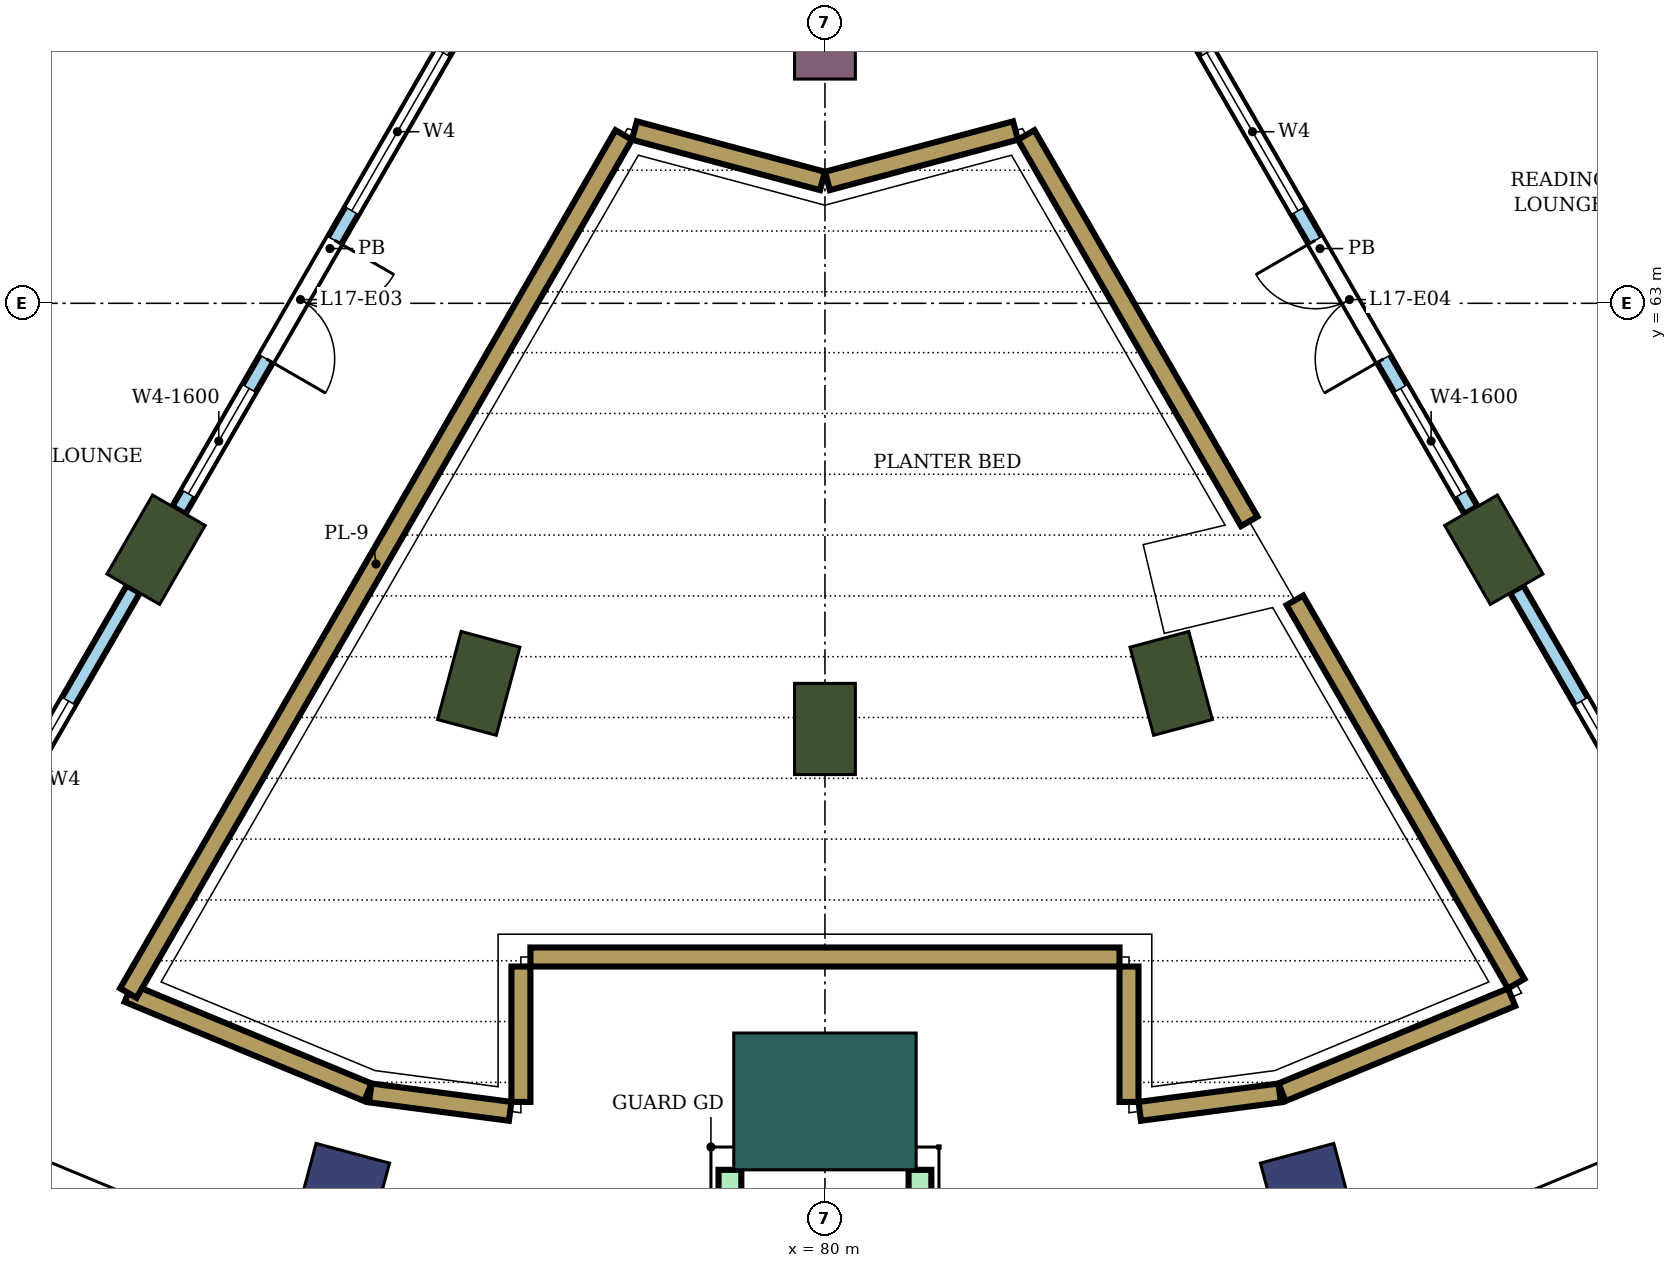
"""IFC4 building model, lengths in metres.
Left out: names, types, materials, properties, quantities, classifications, styles, units other than length and angle.
Written with IfcOpenShell. Run it as: python <this file> out.ifc"""

import sys

from ifc_helpers import new_model, si_unit, direction, frame, frame_2d, origin, origin_2d, place, context, subcontext, project, spatial, rectangle, extrude, element, fill, save


model = new_model("IFC4")
c1 = context("Model", 3, precision=1e-05, world=origin(), true_north=direction((0.0, 1.0)))
c2 = subcontext(c1, "Body", "Model", "MODEL_VIEW")
j1 = project(units=[si_unit("LENGTHUNIT", "METRE"), si_unit("PLANEANGLEUNIT", "RADIAN")], contexts=[c1])
p1 = place(None, origin())
s1 = spatial("IfcSite", under=j1, at=p1, CompositionType="ELEMENT")
p2 = place(p1, origin())
s2 = spatial("IfcBuilding", under=s1, at=p2, CompositionType="ELEMENT")
p3 = place(p2, frame((0.0, 0.0, 74.4)))
s3 = spatial("IfcBuildingStorey", under=s2, at=p3, CompositionType="ELEMENT", Elevation=74.4)
for number, where, z_axis, x_axis in (
    (1, (73.633, 51.238, 0.0), (0.0, 0.0, 1.0), (-0.259, -0.966, 0.0)),
    (2, (86.367, 51.238, 0.0), (0.0, 0.0, 1.0), (0.259, -0.966, 0.0)),
):
    element("IfcColumn", number, at=place(p3, frame(where, z_axis=z_axis, x_axis=x_axis)), inside=s3, PredefinedType="COLUMN", context=c2, shape_type="SweptSolid", body=[
        extrude(rectangle(XDim=1.2, YDim=1.0, at=origin_2d()), origin(), (0.0, 0.0, 1.0), 8.0),
    ])
for number, where, z_axis, x_axis in (
    (3, (71.2, 59.758, 0.0), (0.0, 0.0, 1.0), (-0.5, -0.866, 0.0)),
    (4, (75.445, 58.0, 0.0), (0.0, 0.0, 1.0), (-0.259, -0.966, 0.0)),
    (5, (80.0, 57.4, 0.0), (0.0, 0.0, 1.0), (0.0, -1.0, 0.0)),
    (6, (84.555, 58.0, 0.0), (0.0, 0.0, 1.0), (0.259, -0.966, 0.0)),
    (7, (88.8, 59.758, 0.0), (0.0, 0.0, 1.0), (0.5, -0.866, 0.0)),
):
    element("IfcColumn", number, at=place(p3, frame(where, z_axis=z_axis, x_axis=x_axis)), inside=s3, PredefinedType="COLUMN", context=c2, shape_type="SweptSolid", body=[
        extrude(rectangle(XDim=1.2, YDim=0.8, at=origin_2d()), origin(), (0.0, 0.0, 1.0), 8.0),
    ])
p4 = place(p3, frame((80.0, 66.4, 0.0), z_axis=(0.0, 0.0, 1.0), x_axis=(0.0, -1.0, 0.0)))
e8 = element("IfcColumn", 8, at=p4, inside=s3, PredefinedType="COLUMN", context=c2, shape_type="SweptSolid", body=[
    extrude(rectangle(XDim=0.9, YDim=0.8, at=origin_2d()), origin(), (0.0, 0.0, 1.0), 8.0),
])
p5 = place(p3, frame((80.0, 52.5, 0.0), z_axis=(0.0, 0.0, 1.0), x_axis=(0.0, -1.0, 0.0)))
e9 = element("IfcColumn", 9, at=p5, inside=s3, PredefinedType="COLUMN", context=c2, shape_type="SweptSolid", body=[
    extrude(rectangle(XDim=1.8, YDim=2.4, at=origin_2d()), origin(), (0.0, 0.0, 1.0), 8.0),
])
for number, where, z_axis, x_axis in (
    (10, (78.75, 51.6, 0.0), (0.0, 0.0, 1.0), (0.0, -1.0, 0.0)),
    (11, (81.25, 51.6, 0.0), (0.0, 0.0, 1.0), (0.0, -1.0, 0.0)),
):
    element("IfcWall", number, at=place(p3, frame(where, z_axis=z_axis, x_axis=x_axis)), inside=s3, PredefinedType="NOTDEFINED", context=c2, shape_type="SweptSolid", body=[
        extrude(rectangle(XDim=2.416, YDim=0.3, at=frame_2d((1.208, 0.0))), origin(), (0.0, 0.0, 1.0), 8.0),
    ])
p6 = place(p3, frame((70.835, 53.926, 0.0), z_axis=(0.0, 0.0, 1.0), x_axis=(0.923871147788, -0.38270367425, 0.0)))
e12 = element("IfcWall", 12, at=p6, inside=s3, PredefinedType="USERDEFINED", context=c2, shape_type="SweptSolid", body=[
    extrude(rectangle(XDim=3.411, YDim=0.25, at=frame_2d((1.706, 0.0))), origin(), (0.0, 0.0, 1.0), 0.6),
])
p7 = place(p3, frame((74.018, 52.612, 0.0), z_axis=(0.0, 0.0, 1.0), x_axis=(0.991436829887, -0.130587182926, 0.0)))
e13 = element("IfcWall", 13, at=p7, inside=s3, PredefinedType="USERDEFINED", context=c2, shape_type="SweptSolid", body=[
    extrude(rectangle(XDim=1.856, YDim=0.25, at=frame_2d((0.928, 0.0))), origin(), (0.0, 0.0, 1.0), 0.6),
])
p8 = place(p3, frame((76.0, 52.493, 0.0), z_axis=(0.0, 0.0, 1.0), x_axis=(0.0, 1.0, 0.0)))
e14 = element("IfcWall", 14, at=p8, inside=s3, PredefinedType="USERDEFINED", context=c2, shape_type="SweptSolid", body=[
    extrude(rectangle(XDim=1.781, YDim=0.25, at=frame_2d((0.891, 0.0))), origin(), (0.0, 0.0, 1.0), 0.6),
])
p9 = place(p3, frame((76.125, 54.4, 0.0), z_axis=(0.0, 0.0, 1.0), x_axis=(1.0, 0.0, 0.0)))
e15 = element("IfcWall", 15, at=p9, inside=s3, PredefinedType="USERDEFINED", context=c2, shape_type="SweptSolid", body=[
    extrude(rectangle(XDim=7.75, YDim=0.25, at=frame_2d((3.875, 0.0))), origin(), (0.0, 0.0, 1.0), 0.6),
])
p10 = place(p3, frame((84.0, 54.275, 0.0), z_axis=(0.0, 0.0, 1.0), x_axis=(0.0, -1.0, 0.0)))
e16 = element("IfcWall", 16, at=p10, inside=s3, PredefinedType="USERDEFINED", context=c2, shape_type="SweptSolid", body=[
    extrude(rectangle(XDim=1.781, YDim=0.25, at=frame_2d((0.891, 0.0))), origin(), (0.0, 0.0, 1.0), 0.6),
])
p11 = place(p3, frame((84.141, 52.369, 0.0), z_axis=(0.0, 0.0, 1.0), x_axis=(0.991436829887, 0.130587182926, 0.0)))
e17 = element("IfcWall", 17, at=p11, inside=s3, PredefinedType="USERDEFINED", context=c2, shape_type="SweptSolid", body=[
    extrude(rectangle(XDim=1.856, YDim=0.25, at=frame_2d((0.928, 0.0))), origin(), (0.0, 0.0, 1.0), 0.6),
])
p12 = place(p3, frame((86.014, 52.62, 0.0), z_axis=(0.0, 0.0, 1.0), x_axis=(0.923863886655, 0.382721202621, 0.0)))
e18 = element("IfcWall", 18, at=p12, inside=s3, PredefinedType="USERDEFINED", context=c2, shape_type="SweptSolid", body=[
    extrude(rectangle(XDim=3.269, YDim=0.25, at=frame_2d((1.634, 0.0))), origin(), (0.0, 0.0, 1.0), 0.6),
])
p13 = place(p3, frame((89.094, 54.049, 0.0), z_axis=(0.0, 0.0, 1.0), x_axis=(-0.50000795037, 0.866020813587, 0.0)))
e19 = element("IfcWall", 19, at=p13, inside=s3, PredefinedType="USERDEFINED", context=c2, shape_type="SweptSolid", body=[
    extrude(rectangle(XDim=5.823, YDim=0.25, at=frame_2d((2.912, 0.0))), origin(), (0.0, 0.0, 1.0), 0.6),
])
p14 = place(p3, frame((85.582, 60.131, 0.0), z_axis=(0.0, 0.0, 1.0), x_axis=(-0.499999689456, 0.866025583077, 0.0)))
e20 = element("IfcWall", 20, at=p14, inside=s3, PredefinedType="USERDEFINED", context=c2, shape_type="SweptSolid", body=[
    extrude(rectangle(XDim=5.87, YDim=0.25, at=frame_2d((2.935, 0.0))), origin(), (0.0, 0.0, 1.0), 0.6),
])
for number, where, z_axis, x_axis in (
    (21, (82.507, 65.273, 0.0), (0.0, 0.0, 1.0), (-0.966, -0.259, 0.0)),
    (22, (79.968, 64.61, 0.0), (0.0, 0.0, 1.0), (-0.966, 0.259, 0.0)),
):
    element("IfcWall", number, at=place(p3, frame(where, z_axis=z_axis, x_axis=x_axis)), inside=s3, PredefinedType="USERDEFINED", context=c2, shape_type="SweptSolid", body=[
        extrude(rectangle(XDim=2.562, YDim=0.25, at=frame_2d((1.281, 0.0))), origin(), (0.0, 0.0, 1.0), 0.6),
    ])
p15 = place(p3, frame((77.353, 65.215, 0.0), z_axis=(0.0, 0.0, 1.0), x_axis=(-0.499990498062, -0.866030889661, 0.0)))
e23 = element("IfcWall", 23, at=p15, inside=s3, PredefinedType="USERDEFINED", context=c2, shape_type="SweptSolid", body=[
    extrude(rectangle(XDim=13.035, YDim=0.25, at=frame_2d((6.518, 0.0))), origin(), (0.0, 0.0, 1.0), 0.6),
])
p16 = place(p3, frame((75.475, 67.162, 0.0), z_axis=(0.0, 0.0, 1.0), x_axis=(-0.50001663867, -0.86601579723, 0.0)))
e24 = element("IfcWall", 24, at=p16, inside=s3, PredefinedType="NOTDEFINED", context=c2, shape_type="SweptSolid", body=[
    extrude(rectangle(XDim=7.95, YDim=0.2, at=frame_2d((3.975, 0.0))), origin(), (0.0, 0.0, 1.0), 8.0),
])
p17 = place(p16, frame((1.0, 0.0, 0.3)))
e25 = element("IfcOpeningElement", 25, at=p17, cuts=e24, PredefinedType="OPENING", context=c2, shape_type="SweptSolid", body=[
    extrude(rectangle(XDim=2.4, YDim=3.6, at=frame_2d((1.2, 1.8))), frame((0.0, 0.11, 0.0), z_axis=(0.0, -1.0, 0.0), x_axis=(1.0, 0.0, 0.0)), (0.0, 0.0, 1.0), 0.22),
])
p18 = place(p16, frame((3.85, 0.0, 0.0)))
e26 = element("IfcOpeningElement", 26, at=p18, cuts=e24, PredefinedType="OPENING", context=c2, shape_type="SweptSolid", body=[
    extrude(rectangle(XDim=1.8, YDim=2.4, at=frame_2d((0.9, 1.2))), frame((0.0, 0.11, 0.0), z_axis=(0.0, -1.0, 0.0), x_axis=(1.0, 0.0, 0.0)), (0.0, 0.0, 1.0), 0.22),
])
p19 = place(p16, frame((6.1, 0.0, 0.3)))
e27 = element("IfcOpeningElement", 27, at=p19, cuts=e24, PredefinedType="OPENING", context=c2, shape_type="SweptSolid", body=[
    extrude(rectangle(XDim=1.6, YDim=3.6, at=frame_2d((0.8, 1.8))), frame((0.0, 0.11, 0.0), z_axis=(0.0, -1.0, 0.0), x_axis=(1.0, 0.0, 0.0)), (0.0, 0.0, 1.0), 0.22),
])
p20 = place(p3, frame((70.9, 59.238, 0.0), z_axis=(0.0, 0.0, 1.0), x_axis=(-0.499987231761, -0.866032775405, 0.0)))
e28 = element("IfcWall", 28, at=p20, inside=s3, PredefinedType="NOTDEFINED", context=c2, shape_type="SweptSolid", body=[
    extrude(rectangle(XDim=5.8, YDim=0.2, at=frame_2d((2.9, 0.0))), origin(), (0.0, 0.0, 1.0), 8.0),
])
p21 = place(p20, frame((1.7, 0.0, 0.3)))
e29 = element("IfcOpeningElement", 29, at=p21, cuts=e28, PredefinedType="OPENING", context=c2, shape_type="SweptSolid", body=[
    extrude(rectangle(XDim=2.4, YDim=3.6, at=frame_2d((1.2, 1.8))), frame((0.0, 0.11, 0.0), z_axis=(0.0, -1.0, 0.0), x_axis=(1.0, 0.0, 0.0)), (0.0, 0.0, 1.0), 0.22),
])
p22 = place(p3, frame((84.525, 67.162, 0.0), z_axis=(0.0, 0.0, 1.0), x_axis=(0.50001663867, -0.86601579723, 0.0)))
e30 = element("IfcWall", 30, at=p22, inside=s3, PredefinedType="NOTDEFINED", context=c2, shape_type="SweptSolid", body=[
    extrude(rectangle(XDim=7.95, YDim=0.2, at=frame_2d((3.975, 0.0))), origin(), (0.0, 0.0, 1.0), 8.0),
])
p23 = place(p22, frame((1.0, 0.0, 0.3)))
e31 = element("IfcOpeningElement", 31, at=p23, cuts=e30, PredefinedType="OPENING", context=c2, shape_type="SweptSolid", body=[
    extrude(rectangle(XDim=2.4, YDim=3.6, at=frame_2d((1.2, 1.8))), frame((0.0, 0.11, 0.0), z_axis=(0.0, -1.0, 0.0), x_axis=(1.0, 0.0, 0.0)), (0.0, 0.0, 1.0), 0.22),
])
p24 = place(p22, frame((3.85, 0.0, 0.0)))
e32 = element("IfcOpeningElement", 32, at=p24, cuts=e30, PredefinedType="OPENING", context=c2, shape_type="SweptSolid", body=[
    extrude(rectangle(XDim=1.8, YDim=2.4, at=frame_2d((0.9, 1.2))), frame((0.0, 0.11, 0.0), z_axis=(0.0, -1.0, 0.0), x_axis=(1.0, 0.0, 0.0)), (0.0, 0.0, 1.0), 0.22),
])
p25 = place(p22, frame((6.1, 0.0, 0.3)))
e33 = element("IfcOpeningElement", 33, at=p25, cuts=e30, PredefinedType="OPENING", context=c2, shape_type="SweptSolid", body=[
    extrude(rectangle(XDim=1.6, YDim=3.6, at=frame_2d((0.8, 1.8))), frame((0.0, 0.11, 0.0), z_axis=(0.0, -1.0, 0.0), x_axis=(1.0, 0.0, 0.0)), (0.0, 0.0, 1.0), 0.22),
])
p26 = place(p3, frame((89.1, 59.238, 0.0), z_axis=(0.0, 0.0, 1.0), x_axis=(0.499987231761, -0.866032775405, 0.0)))
e34 = element("IfcWall", 34, at=p26, inside=s3, PredefinedType="NOTDEFINED", context=c2, shape_type="SweptSolid", body=[
    extrude(rectangle(XDim=5.8, YDim=0.2, at=frame_2d((2.9, 0.0))), origin(), (0.0, 0.0, 1.0), 8.0),
])
p27 = place(p26, frame((1.7, 0.0, 0.3)))
e35 = element("IfcOpeningElement", 35, at=p27, cuts=e34, PredefinedType="OPENING", context=c2, shape_type="SweptSolid", body=[
    extrude(rectangle(XDim=2.4, YDim=3.6, at=frame_2d((1.2, 1.8))), frame((0.0, 0.11, 0.0), z_axis=(0.0, -1.0, 0.0), x_axis=(1.0, 0.0, 0.0)), (0.0, 0.0, 1.0), 0.22),
])
p28 = place(p17, origin())
e36 = element("IfcWindow", 36, at=p28, inside=s3, PartitioningType="SINGLE_PANEL", PredefinedType="WINDOW", context=c2, shape_type="SweptSolid", body=[
    extrude(rectangle(XDim=2.4, YDim=3.6, at=frame_2d((1.2, 1.8))), frame((0.0, 0.03, 0.0), z_axis=(0.0, -1.0, 0.0), x_axis=(1.0, 0.0, 0.0)), (0.0, 0.0, 1.0), 0.06),
])
fill(e25, e36)
p29 = place(p18, origin())
e37 = element("IfcDoor", 37, at=p29, inside=s3, OperationType="DOUBLE_DOOR_SINGLE_SWING", PredefinedType="DOOR", context=c2, shape_type="SweptSolid", body=[
    extrude(rectangle(XDim=1.8, YDim=2.4, at=frame_2d((0.9, 1.2))), frame((0.0, 0.025, 0.0), z_axis=(0.0, -1.0, 0.0), x_axis=(1.0, 0.0, 0.0)), (0.0, 0.0, 1.0), 0.05),
])
fill(e26, e37)
p30 = place(p19, origin())
e38 = element("IfcWindow", 38, at=p30, inside=s3, PartitioningType="SINGLE_PANEL", PredefinedType="WINDOW", context=c2, shape_type="SweptSolid", body=[
    extrude(rectangle(XDim=1.6, YDim=3.6, at=frame_2d((0.8, 1.8))), frame((0.0, 0.03, 0.0), z_axis=(0.0, -1.0, 0.0), x_axis=(1.0, 0.0, 0.0)), (0.0, 0.0, 1.0), 0.06),
])
fill(e27, e38)
p31 = place(p21, origin())
e39 = element("IfcWindow", 39, at=p31, inside=s3, PartitioningType="SINGLE_PANEL", PredefinedType="WINDOW", context=c2, shape_type="SweptSolid", body=[
    extrude(rectangle(XDim=2.4, YDim=3.6, at=frame_2d((1.2, 1.8))), frame((0.0, 0.03, 0.0), z_axis=(0.0, -1.0, 0.0), x_axis=(1.0, 0.0, 0.0)), (0.0, 0.0, 1.0), 0.06),
])
fill(e29, e39)
p32 = place(p23, origin())
e40 = element("IfcWindow", 40, at=p32, inside=s3, PartitioningType="SINGLE_PANEL", PredefinedType="WINDOW", context=c2, shape_type="SweptSolid", body=[
    extrude(rectangle(XDim=2.4, YDim=3.6, at=frame_2d((1.2, 1.8))), frame((0.0, 0.03, 0.0), z_axis=(0.0, -1.0, 0.0), x_axis=(1.0, 0.0, 0.0)), (0.0, 0.0, 1.0), 0.06),
])
fill(e31, e40)
p33 = place(p24, frame((1.8, 0.0, 0.0), z_axis=(0.0, 0.0, 1.0), x_axis=(-1.0, 0.0, 0.0)))
e41 = element("IfcDoor", 41, at=p33, inside=s3, OperationType="DOUBLE_DOOR_SINGLE_SWING", PredefinedType="DOOR", context=c2, shape_type="SweptSolid", body=[
    extrude(rectangle(XDim=1.8, YDim=2.4, at=frame_2d((0.9, 1.2))), frame((0.0, 0.025, 0.0), z_axis=(0.0, -1.0, 0.0), x_axis=(1.0, 0.0, 0.0)), (0.0, 0.0, 1.0), 0.05),
])
fill(e32, e41)
p34 = place(p25, origin())
e42 = element("IfcWindow", 42, at=p34, inside=s3, PartitioningType="SINGLE_PANEL", PredefinedType="WINDOW", context=c2, shape_type="SweptSolid", body=[
    extrude(rectangle(XDim=1.6, YDim=3.6, at=frame_2d((0.8, 1.8))), frame((0.0, 0.03, 0.0), z_axis=(0.0, -1.0, 0.0), x_axis=(1.0, 0.0, 0.0)), (0.0, 0.0, 1.0), 0.06),
])
fill(e33, e42)
p35 = place(p27, origin())
e43 = element("IfcWindow", 43, at=p35, inside=s3, PartitioningType="SINGLE_PANEL", PredefinedType="WINDOW", context=c2, shape_type="SweptSolid", body=[
    extrude(rectangle(XDim=2.4, YDim=3.6, at=frame_2d((1.2, 1.8))), frame((0.0, 0.03, 0.0), z_axis=(0.0, -1.0, 0.0), x_axis=(1.0, 0.0, 0.0)), (0.0, 0.0, 1.0), 0.06),
])
fill(e35, e43)
save(model, sys.argv[1])
